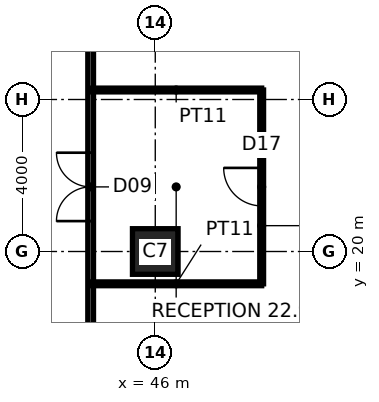
"""IFC4 building model, lengths in metres.
Left out: names, types, materials, properties, quantities, classifications, styles, units other than length and angle.
Written with IfcOpenShell. Run it as: python <this file> out.ifc"""

import sys

from ifc_helpers import new_model, si_unit, direction, frame, frame_2d, origin, origin_2d, place, context, subcontext, project, spatial, rectangle, hollow_rectangle, extrude, element, fill, save


model = new_model("IFC4")
c1 = context("Model", 3, precision=1e-05, world=origin(), true_north=direction((0.0, 1.0)))
c2 = subcontext(c1, "Body", "Model", "MODEL_VIEW")
j1 = project(units=[si_unit("LENGTHUNIT", "METRE"), si_unit("PLANEANGLEUNIT", "RADIAN")], contexts=[c1])
p1 = place(None, origin())
s1 = spatial("IfcSite", under=j1, at=p1, CompositionType="ELEMENT")
p2 = place(p1, origin())
s2 = spatial("IfcBuilding", under=s1, at=p2, CompositionType="ELEMENT")
p3 = place(p2, frame((0.0, 0.0, 19.0)))
s3 = spatial("IfcBuildingStorey", under=s2, at=p3, CompositionType="ELEMENT", Elevation=19.0)
p4 = place(p3, frame((46.0, 20.0, 0.0), z_axis=(0.0, 0.0, 1.0), x_axis=(1.0, 0.0, 0.0)))
e1 = element("IfcColumn", 1, at=p4, inside=s3, PredefinedType="COLUMN", context=c2, shape_type="SweptSolid", body=[
    extrude(hollow_rectangle(XDim=1.2, YDim=1.2, WallThickness=0.1, at=origin_2d()), origin(), (0.0, 0.0, 1.0), 4.0),
])
p5 = place(p3, frame((44.3, 15.225, 0.0), z_axis=(0.0, 0.0, 1.0), x_axis=(0.0, 1.0, 0.0)))
e2 = element("IfcWall", 2, at=p5, inside=s3, PredefinedType="PARTITIONING", context=c2, shape_type="SweptSolid", body=[
    extrude(rectangle(XDim=23.55, YDim=0.15, at=frame_2d((11.775, 0.0))), origin(), (0.0, 0.0, 1.0), 3.85),
])
p6 = place(p5, frame((5.575, 0.0, 0.0)))
e3 = element("IfcOpeningElement", 3, at=p6, cuts=e2, PredefinedType="OPENING", context=c2, shape_type="SweptSolid", body=[
    extrude(rectangle(XDim=1.8, YDim=2.4, at=frame_2d((0.9, 1.2))), frame((0.0, 0.085, 0.0), z_axis=(0.0, -1.0, 0.0), x_axis=(1.0, 0.0, 0.0)), (0.0, 0.0, 1.0), 0.17),
])
p7 = place(p5, frame((16.825, 0.0, 0.0)))
e4 = element("IfcOpeningElement", 4, at=p7, cuts=e2, PredefinedType="OPENING", context=c2, shape_type="SweptSolid", body=[
    extrude(rectangle(XDim=1.8, YDim=2.4, at=frame_2d((0.9, 1.2))), frame((0.0, 0.085, 0.0), z_axis=(0.0, -1.0, 0.0), x_axis=(1.0, 0.0, 0.0)), (0.0, 0.0, 1.0), 0.17),
])
p8 = place(p3, frame((44.3, 19.15, 0.0), z_axis=(0.0, 0.0, 1.0), x_axis=(1.0, 0.0, 0.0)))
e5 = element("IfcWall", 5, at=p8, inside=s3, PredefinedType="PARTITIONING", context=c2, shape_type="SweptSolid", body=[
    extrude(rectangle(XDim=4.5, YDim=0.1, at=frame_2d((2.25, 0.0))), origin(), (0.0, 0.0, 1.0), 3.85),
])
p9 = place(p3, frame((48.8, 19.15, 0.0), z_axis=(0.0, 0.0, 1.0), x_axis=(0.0, 1.0, 0.0)))
e6 = element("IfcWall", 6, at=p9, inside=s3, PredefinedType="PARTITIONING", context=c2, shape_type="SweptSolid", body=[
    extrude(rectangle(XDim=5.1, YDim=0.1, at=frame_2d((2.55, 0.0))), origin(), (0.0, 0.0, 1.0), 3.85),
])
p10 = place(p9, frame((2.05, 0.0, 0.0)))
e7 = element("IfcOpeningElement", 7, at=p10, cuts=e6, PredefinedType="OPENING", context=c2, shape_type="SweptSolid", body=[
    extrude(rectangle(XDim=1.0, YDim=2.2, at=frame_2d((0.5, 1.1))), frame((0.0, 0.06, 0.0), z_axis=(0.0, -1.0, 0.0), x_axis=(1.0, 0.0, 0.0)), (0.0, 0.0, 1.0), 0.12),
])
p11 = place(p3, frame((48.8, 24.25, 0.0), z_axis=(0.0, 0.0, 1.0), x_axis=(-1.0, 0.0, 0.0)))
e8 = element("IfcWall", 8, at=p11, inside=s3, PredefinedType="PARTITIONING", context=c2, shape_type="SweptSolid", body=[
    extrude(rectangle(XDim=4.5, YDim=0.1, at=frame_2d((2.25, 0.0))), origin(), (0.0, 0.0, 1.0), 3.85),
])
p12 = place(p6, origin())
e9 = element("IfcDoor", 9, at=p12, inside=s3, OperationType="DOUBLE_DOOR_DOUBLE_SWING", PredefinedType="DOOR", context=c2, shape_type="SweptSolid", body=[
    extrude(rectangle(XDim=1.8, YDim=2.4, at=frame_2d((0.9, 1.2))), frame((0.0, 0.025, 0.0), z_axis=(0.0, -1.0, 0.0), x_axis=(1.0, 0.0, 0.0)), (0.0, 0.0, 1.0), 0.05),
])
fill(e3, e9)
p13 = place(p10, origin())
e10 = element("IfcDoor", 10, at=p13, inside=s3, OperationType="SINGLE_SWING_RIGHT", PredefinedType="DOOR", context=c2, shape_type="SweptSolid", body=[
    extrude(rectangle(XDim=1.0, YDim=2.2, at=frame_2d((0.5, 1.1))), frame((0.0, 0.025, 0.0), z_axis=(0.0, -1.0, 0.0), x_axis=(1.0, 0.0, 0.0)), (0.0, 0.0, 1.0), 0.05),
])
fill(e7, e10)
save(model, sys.argv[1])
